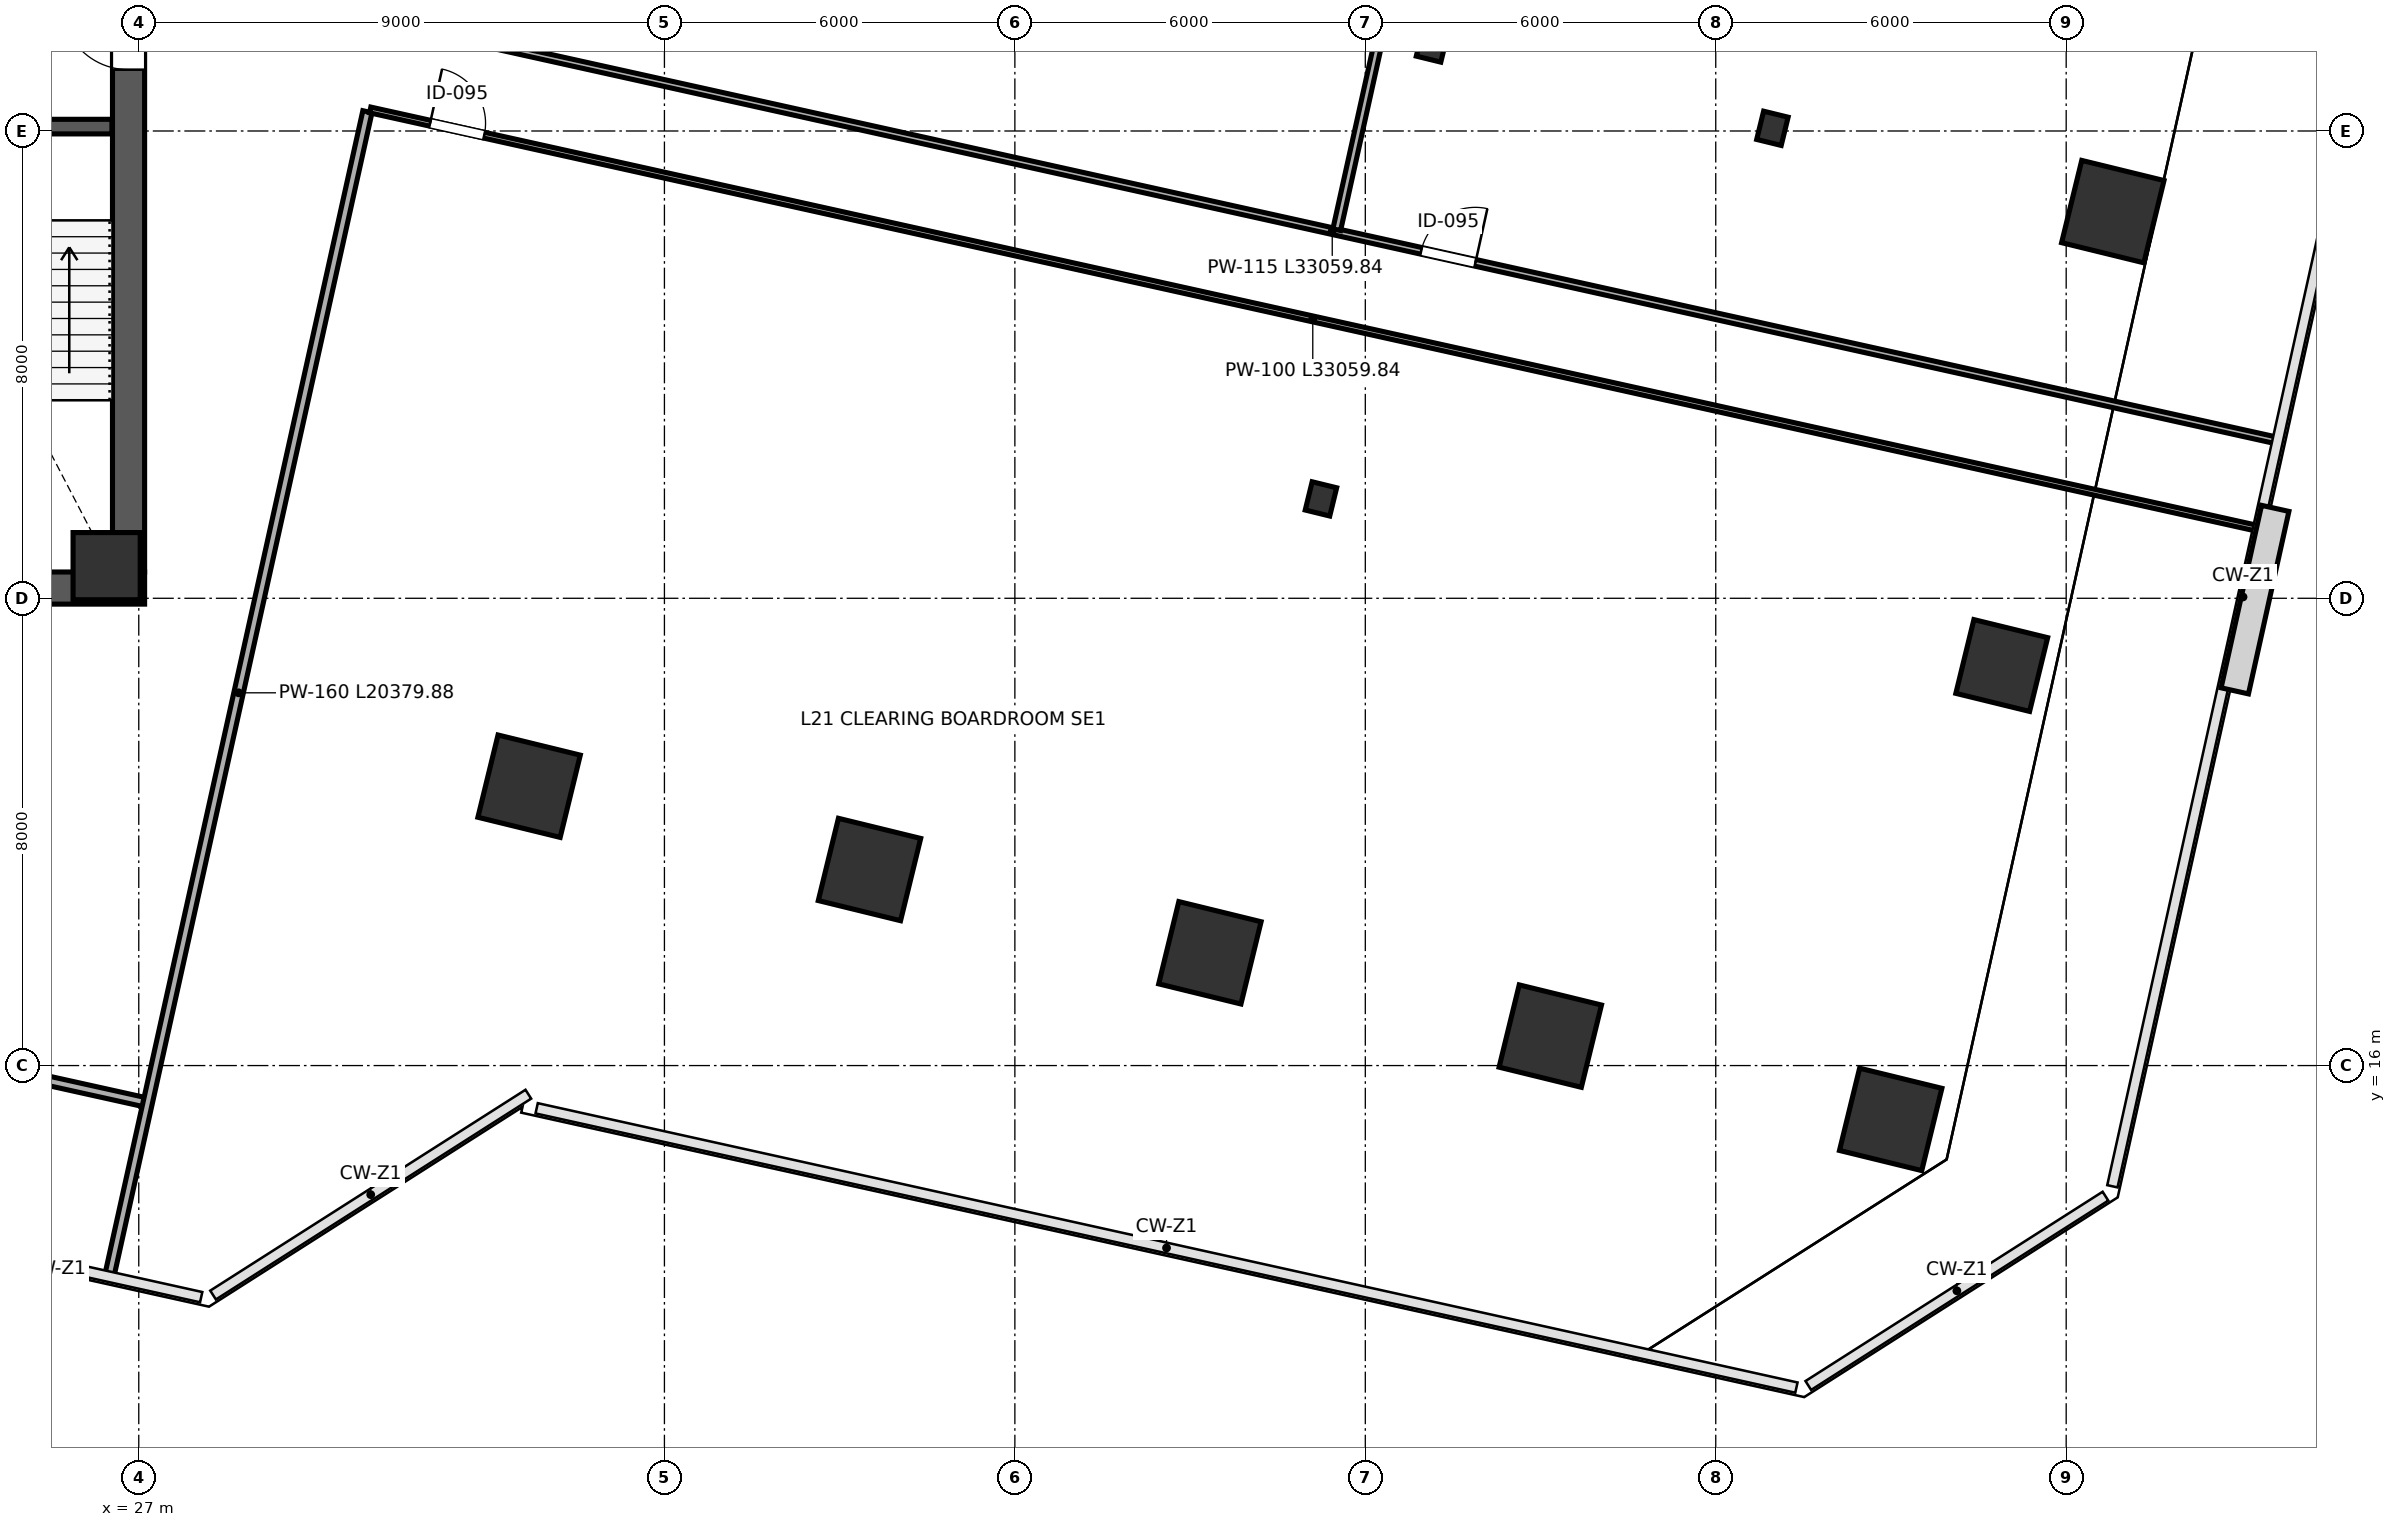
"""IFC4 building model, lengths in metres.
Left out: names, types, materials, properties, quantities, classifications, styles, units other than length and angle.
Written with IfcOpenShell. Run it as: python <this file> out.ifc"""

import sys

from ifc_helpers import new_model, si_unit, direction, frame, frame_2d, origin, origin_2d, place, context, subcontext, project, spatial, rectangle, i_section, extrude, clip, halfspace, source, transform, mapped, element, fill, save


model = new_model("IFC4")
c1 = context("Model", 3, precision=1e-05, world=origin(), true_north=direction((0.0, 1.0)))
c2 = subcontext(c1, "Body", "Model", "MODEL_VIEW")
j1 = project(units=[si_unit("LENGTHUNIT", "METRE"), si_unit("PLANEANGLEUNIT", "RADIAN")], contexts=[c1])
p1 = place(None, origin())
s1 = spatial("IfcSite", under=j1, at=p1, CompositionType="ELEMENT")
p2 = place(p1, origin())
s2 = spatial("IfcBuilding", under=s1, at=p2, CompositionType="ELEMENT")
p3 = place(p2, frame((0.0, 0.0, 95.8)))
s3 = spatial("IfcBuildingStorey", under=s2, at=p3, CompositionType="ELEMENT", Elevation=95.8)
m1 = source(origin(), c2, "Body", "SweptSolid", [
    extrude(rectangle(XDim=1.15, YDim=1.15, at=origin_2d()), origin(), (0.0, 0.0, 1.0), 4.198),
])
p4 = place(p3, frame((26.45, 24.55, 0.001), z_axis=(0.0, 0.0, 1.0), x_axis=(1.0, 0.0, 0.0)))
e1 = element("IfcColumn", 1, at=p4, inside=s3, PredefinedType="COLUMN", context=c2, shape_type="MappedRepresentation", body=[
    mapped(m1, transform((0.0, 0.0, 0.0), scale=1.0)),
])
p5 = place(p3, frame((33.683, 20.783, 0.0), z_axis=(-0.058784219019, -0.062374979196, 0.996320118017), x_axis=(-0.544471118639, 0.838532157518, 0.020372083255)))
e2 = element("IfcColumn", 2, at=p5, inside=s3, PredefinedType="COLUMN", context=c2, shape_type="Clipping", body=[
    clip(clip(extrude(rectangle(XDim=1.45, YDim=1.45, at=origin_2d()), origin(), (0.0, 0.0, 1.0), 4.216), halfspace(frame((0.0, 0.0, 0.076), z_axis=(0.0, 0.0, -1.0), x_axis=(1.0, 0.0, 0.0)), False)), halfspace(frame((0.0, 0.0, 4.139), z_axis=(0.0, 0.0, 1.0), x_axis=(1.0, 0.0, 0.0)), False)),
])
p6 = place(p3, frame((39.511, 19.357, 0.0), z_axis=(-0.066243141564, -0.092232168332, 0.993531616669), x_axis=(-0.651184265273, 0.75843955537, 0.026990618942)))
e3 = element("IfcColumn", 3, at=p6, inside=s3, PredefinedType="COLUMN", context=c2, shape_type="Clipping", body=[
    clip(clip(extrude(rectangle(XDim=1.45, YDim=1.45, at=origin_2d()), origin(), (0.0, 0.0, 1.0), 4.227), halfspace(frame((0.0, 0.0, 0.101), z_axis=(0.0, 0.0, -1.0), x_axis=(1.0, 0.0, 0.0)), False)), halfspace(frame((0.0, 0.0, 4.126), z_axis=(0.0, 0.0, 1.0), x_axis=(1.0, 0.0, 0.0)), False)),
])
p7 = place(p3, frame((45.339, 17.931, 0.0), z_axis=(-0.073648005459, -0.121806896528, 0.989817685864), x_axis=(-0.709488778205, 0.703904141018, 0.033832437972)))
e4 = element("IfcColumn", 4, at=p7, inside=s3, PredefinedType="COLUMN", context=c2, shape_type="Clipping", body=[
    clip(clip(extrude(rectangle(XDim=1.45, YDim=1.45, at=origin_2d()), origin(), (0.0, 0.0, 1.0), 4.243), halfspace(frame((0.0, 0.0, 0.127), z_axis=(0.0, 0.0, -1.0), x_axis=(1.0, 0.0, 0.0)), False)), halfspace(frame((0.0, 0.0, 4.116), z_axis=(0.0, 0.0, 1.0), x_axis=(1.0, 0.0, 0.0)), False)),
])
p8 = place(p3, frame((47.24, 25.701, 0.0), z_axis=(-0.033860756717, -0.132103020252, 0.99065747925), x_axis=(-0.882459563694, 0.469270120304, 0.03241408083)))
e5 = element("IfcColumn", 5, at=p8, inside=s3, PredefinedType="COLUMN", context=c2, shape_type="Clipping", body=[
    clip(clip(extrude(i_section(OverallWidth=0.432, OverallDepth=0.498, WebThickness=0.056, FlangeThickness=0.089, FilletRadius=0.015, at=origin_2d()), origin(), (0.0, 0.0, 1.0), 4.24), halfspace(frame((0.0, 0.0, 0.041), z_axis=(0.0, 0.0, -1.0), x_axis=(1.0, 0.0, 0.0)), False)), halfspace(frame((0.0, 0.0, 4.198), z_axis=(0.0, 0.0, 1.0), x_axis=(1.0, 0.0, 0.0)), False)),
])
p9 = place(p3, frame((49.142, 33.472, 0.0), z_axis=(0.005983885477, -0.142232354801, 0.98981521021), x_axis=(-0.980372715523, 0.194227773312, 0.033836529561)))
e6 = element("IfcColumn", 6, at=p9, inside=s3, PredefinedType="COLUMN", context=c2, shape_type="Clipping", body=[
    clip(clip(extrude(i_section(OverallWidth=0.432, OverallDepth=0.498, WebThickness=0.056, FlangeThickness=0.089, FilletRadius=0.015, at=origin_2d()), origin(), (0.0, 0.0, 1.0), 4.243), halfspace(frame((0.0, 0.0, 0.043), z_axis=(0.0, 0.0, -1.0), x_axis=(1.0, 0.0, 0.0)), False)), halfspace(frame((0.0, 0.0, 4.2), z_axis=(0.0, 0.0, 1.0), x_axis=(1.0, 0.0, 0.0)), False)),
])
p10 = place(p3, frame((51.167, 16.504, 0.0), z_axis=(-0.080923667154, -0.150908607892, 0.985229898125), x_axis=(-0.745362832853, 0.665415442053, 0.040700575887)))
e7 = element("IfcColumn", 7, at=p10, inside=s3, PredefinedType="COLUMN", context=c2, shape_type="Clipping", body=[
    clip(clip(extrude(rectangle(XDim=1.45, YDim=1.45, at=origin_2d()), origin(), (0.0, 0.0, 1.0), 4.263), halfspace(frame((0.0, 0.0, 0.153), z_axis=(0.0, 0.0, -1.0), x_axis=(1.0, 0.0, 0.0)), False)), halfspace(frame((0.0, 0.0, 4.11), z_axis=(0.0, 0.0, 1.0), x_axis=(1.0, 0.0, 0.0)), False)),
])
p11 = place(p3, frame((54.97, 32.046, 0.0), z_axis=(-0.001660850625, -0.171239426504, 0.985228044864), x_axis=(-0.969025231854, 0.243584393687, 0.040703110237)))
e8 = element("IfcColumn", 8, at=p11, inside=s3, PredefinedType="COLUMN", context=c2, shape_type="Clipping", body=[
    clip(clip(extrude(i_section(OverallWidth=0.432, OverallDepth=0.498, WebThickness=0.056, FlangeThickness=0.089, FilletRadius=0.015, at=origin_2d()), origin(), (0.0, 0.0, 1.0), 4.263), halfspace(frame((0.0, 0.0, 0.052), z_axis=(0.0, 0.0, -1.0), x_axis=(1.0, 0.0, 0.0)), False)), halfspace(frame((0.0, 0.0, 4.211), z_axis=(0.0, 0.0, 1.0), x_axis=(1.0, 0.0, 0.0)), False)),
])
p12 = place(p3, frame((56.995, 15.078, 0.0), z_axis=(-0.08805046164, -0.179689008068, 0.979774962216), x_axis=(-0.769777450885, 0.636537960512, 0.047561548936)))
e9 = element("IfcColumn", 9, at=p12, inside=s3, PredefinedType="COLUMN", context=c2, shape_type="Clipping", body=[
    clip(clip(extrude(rectangle(XDim=1.45, YDim=1.45, at=origin_2d()), origin(), (0.0, 0.0, 1.0), 4.287), halfspace(frame((0.0, 0.0, 0.18), z_axis=(0.0, 0.0, -1.0), x_axis=(1.0, 0.0, 0.0)), False)), halfspace(frame((0.0, 0.0, 4.107), z_axis=(0.0, 0.0, 1.0), x_axis=(1.0, 0.0, 0.0)), False)),
])
p13 = place(p3, frame((58.897, 22.849, 0.0), z_axis=(-0.048735307847, -0.189982200062, 0.980577194018), x_axis=(-0.882964707532, 0.467118904465, 0.046618176111)))
e10 = element("IfcColumn", 10, at=p13, inside=s3, PredefinedType="COLUMN", context=c2, shape_type="Clipping", body=[
    clip(clip(extrude(rectangle(XDim=1.3, YDim=1.3, at=origin_2d()), origin(), (0.0, 0.0, 1.0), 4.283), halfspace(frame((0.0, 0.0, 0.158), z_axis=(0.0, 0.0, -1.0), x_axis=(1.0, 0.0, 0.0)), False)), halfspace(frame((0.0, 0.0, 4.125), z_axis=(0.0, 0.0, 1.0), x_axis=(1.0, 0.0, 0.0)), False)),
])
p14 = place(p3, frame((60.798, 30.62, 0.0), z_axis=(-0.009169522057, -0.199906971547, 0.979771974794), x_axis=(-0.959651199018, 0.277141019279, 0.047565025555)))
e11 = element("IfcColumn", 11, at=p14, inside=s3, PredefinedType="COLUMN", context=c2, shape_type="Clipping", body=[
    clip(clip(extrude(rectangle(XDim=1.45, YDim=1.45, at=origin_2d()), origin(), (0.0, 0.0, 1.0), 4.287), halfspace(frame((0.0, 0.0, 0.18), z_axis=(0.0, 0.0, -1.0), x_axis=(1.0, 0.0, 0.0)), False)), halfspace(frame((0.0, 0.0, 4.107), z_axis=(0.0, 0.0, 1.0), x_axis=(1.0, 0.0, 0.0)), False)),
])
p15 = place(p3, frame((26.825, 24.45, 0.0), z_axis=(0.0, 0.0, 1.0), x_axis=(0.0, 1.0, 0.0)))
e12 = element("IfcWall", 12, at=p15, inside=s3, PredefinedType="SHEAR", context=c2, shape_type="SweptSolid", body=[
    extrude(rectangle(XDim=15.1, YDim=0.55, at=frame_2d((7.55, 0.0))), origin(), (0.0, 0.0, 1.0), 3.96),
])
p16 = place(p15, frame((8.6, 0.0, 0.0)))
e13 = element("IfcOpeningElement", 13, at=p16, cuts=e12, PredefinedType="OPENING", context=c2, shape_type="SweptSolid", body=[
    extrude(rectangle(XDim=1.15, YDim=2.2, at=frame_2d((0.575, 1.1))), frame((0.0, 0.285, 0.0), z_axis=(0.0, -1.0, 0.0), x_axis=(1.0, 0.0, 0.0)), (0.0, 0.0, 1.0), 0.57),
])
p17 = place(p3, frame((8.9, 24.175, 0.0), z_axis=(0.0, 0.0, 1.0), x_axis=(1.0, 0.0, 0.0)))
e14 = element("IfcWall", 14, at=p17, inside=s3, PredefinedType="SHEAR", context=c2, shape_type="SweptSolid", body=[
    extrude(rectangle(XDim=18.2, YDim=0.55, at=frame_2d((9.1, 0.0))), origin(), (0.0, 0.0, 1.0), 3.96),
])
p18 = place(p3, frame((23.19, 32.075, 0.0), z_axis=(0.0, 0.0, 1.0), x_axis=(1.0, 0.0, 0.0)))
e15 = element("IfcWall", 15, at=p18, inside=s3, PredefinedType="SHEAR", context=c2, shape_type="SweptSolid", body=[
    extrude(rectangle(XDim=3.35, YDim=0.25, at=frame_2d((1.675, 0.0))), origin(), (0.0, 0.0, 1.0), 3.96),
])
p19 = place(p18, frame((0.85, 0.0, 0.0)))
e16 = element("IfcOpeningElement", 16, at=p19, cuts=e15, PredefinedType="OPENING", context=c2, shape_type="SweptSolid", body=[
    extrude(rectangle(XDim=1.15, YDim=2.2, at=frame_2d((0.575, 1.1))), frame((0.0, 0.135, 0.0), z_axis=(0.0, -1.0, 0.0), x_axis=(1.0, 0.0, 0.0)), (0.0, 0.0, 1.0), 0.27),
])
p20 = place(p3, frame((9.16, 19.351, 0.0), z_axis=(0.0, 0.0, 1.0), x_axis=(0.97629657883, -0.216437035106, 0.0)))
e17 = element("IfcWall", 17, at=p20, inside=s3, PredefinedType="PARTITIONING", context=c2, shape_type="SweptSolid", body=[
    extrude(rectangle(XDim=18.39, YDim=0.16, at=frame_2d((9.195, 0.0))), origin(), (0.0, 0.0, 1.0), 3.96),
])
p21 = place(p20, frame((1.45, 0.0, 0.0)))
e18 = element("IfcOpeningElement", 18, at=p21, cuts=e17, PredefinedType="OPENING", context=c2, shape_type="SweptSolid", body=[
    extrude(rectangle(XDim=0.95, YDim=2.15, at=frame_2d((0.475, 1.075))), frame((0.0, 0.09, 0.0), z_axis=(0.0, -1.0, 0.0), x_axis=(1.0, 0.0, 0.0)), (0.0, 0.0, 1.0), 0.18),
])
p22 = place(p3, frame((26.504, 12.433, 0.0), z_axis=(0.0, 0.0, 1.0), x_axis=(0.216434476574, 0.976297146032, 0.0)))
e19 = element("IfcWall", 19, at=p22, inside=s3, PredefinedType="PARTITIONING", context=c2, shape_type="SweptSolid", body=[
    extrude(rectangle(XDim=20.38, YDim=0.16, at=frame_2d((10.19, 0.0))), origin(), (0.0, 0.0, 1.0), 3.96),
])
p23 = place(p3, frame((31.296, 33.864, 0.0), z_axis=(0.0, 0.0, 1.0), x_axis=(0.976295884124, -0.216440168738, 0.0)))
e20 = element("IfcWall", 20, at=p23, inside=s3, PredefinedType="PARTITIONING", context=c2, shape_type="SweptSolid", body=[
    extrude(rectangle(XDim=33.06, YDim=0.115, at=frame_2d((16.53, 0.0))), origin(), (0.0, 0.0, 1.0), 3.095),
])
p24 = place(p23, frame((1.05, 0.0, 0.0)))
e21 = element("IfcOpeningElement", 21, at=p24, cuts=e20, PredefinedType="OPENING", context=c2, shape_type="SweptSolid", body=[
    extrude(rectangle(XDim=0.95, YDim=2.15, at=frame_2d((0.475, 1.075))), frame((0.0, 0.067, 0.0), z_axis=(0.0, -1.0, 0.0), x_axis=(1.0, 0.0, 0.0)), (0.0, 0.0, 1.0), 0.135),
])
p25 = place(p23, frame((18.09, 0.0, 0.0)))
e22 = element("IfcOpeningElement", 22, at=p25, cuts=e20, PredefinedType="OPENING", context=c2, shape_type="SweptSolid", body=[
    extrude(rectangle(XDim=0.95, YDim=2.15, at=frame_2d((0.475, 1.075))), frame((0.0, 0.067, 0.0), z_axis=(0.0, -1.0, 0.0), x_axis=(1.0, 0.0, 0.0)), (0.0, 0.0, 1.0), 0.135),
])
p26 = place(p3, frame((30.962, 32.361, 0.0), z_axis=(0.0, 0.0, 1.0), x_axis=(0.976295538171, -0.216441729221, 0.0)))
e23 = element("IfcWall", 23, at=p26, inside=s3, PredefinedType="PARTITIONING", context=c2, shape_type="SweptSolid", body=[
    extrude(rectangle(XDim=33.06, YDim=0.1, at=frame_2d((16.53, 0.0))), origin(), (0.0, 0.0, 1.0), 3.095),
])
p27 = place(p26, frame((1.05, 0.0, 0.0)))
e24 = element("IfcOpeningElement", 24, at=p27, cuts=e23, PredefinedType="OPENING", context=c2, shape_type="SweptSolid", body=[
    extrude(rectangle(XDim=0.95, YDim=2.15, at=frame_2d((0.475, 1.075))), frame((0.0, 0.06, 0.0), z_axis=(0.0, -1.0, 0.0), x_axis=(1.0, 0.0, 0.0)), (0.0, 0.0, 1.0), 0.12),
])
p28 = place(p3, frame((47.511, 30.31, 0.0), z_axis=(0.0, 0.0, 1.0), x_axis=(0.216425867349, 0.976299054564, 0.0)))
e25 = element("IfcWall", 25, at=p28, inside=s3, PredefinedType="PARTITIONING", context=c2, shape_type="SweptSolid", body=[
    extrude(rectangle(XDim=12.04, YDim=0.135, at=frame_2d((6.02, 0.0))), origin(), (0.0, 0.0, 1.0), 3.323),
])
m2 = source(origin(), c2, "Body", "SweptSolid", [
    extrude(rectangle(XDim=1.15, YDim=2.2, at=frame_2d((0.575, 1.1))), frame((0.0, 0.025, 0.0), z_axis=(0.0, -1.0, 0.0), x_axis=(1.0, 0.0, 0.0)), (0.0, 0.0, 1.0), 0.05),
])
p29 = place(p16, origin())
e26 = element("IfcDoor", 26, at=p29, inside=s3, OperationType="SINGLE_SWING_RIGHT", PredefinedType="DOOR", context=c2, shape_type="MappedRepresentation", body=[
    mapped(m2, transform((0.0, 0.0, 0.0), scale=1.0)),
])
fill(e13, e26)
m3 = source(origin(), c2, "Body", "SweptSolid", [
    extrude(rectangle(XDim=0.95, YDim=2.15, at=frame_2d((0.475, 1.075))), frame((0.0, 0.025, 0.0), z_axis=(0.0, -1.0, 0.0), x_axis=(1.0, 0.0, 0.0)), (0.0, 0.0, 1.0), 0.05),
])
p30 = place(p25, origin())
e27 = element("IfcDoor", 27, at=p30, inside=s3, OperationType="SINGLE_SWING_RIGHT", PredefinedType="DOOR", context=c2, shape_type="MappedRepresentation", body=[
    mapped(m3, transform((0.0, 0.0, 0.0), scale=1.0)),
])
fill(e22, e27)
p31 = place(p27, origin())
e28 = element("IfcDoor", 28, at=p31, inside=s3, OperationType="SINGLE_SWING_LEFT", PredefinedType="DOOR", context=c2, shape_type="MappedRepresentation", body=[
    mapped(m3, transform((0.0, 0.0, 0.0), scale=1.0)),
])
fill(e24, e28)
save(model, sys.argv[1])
